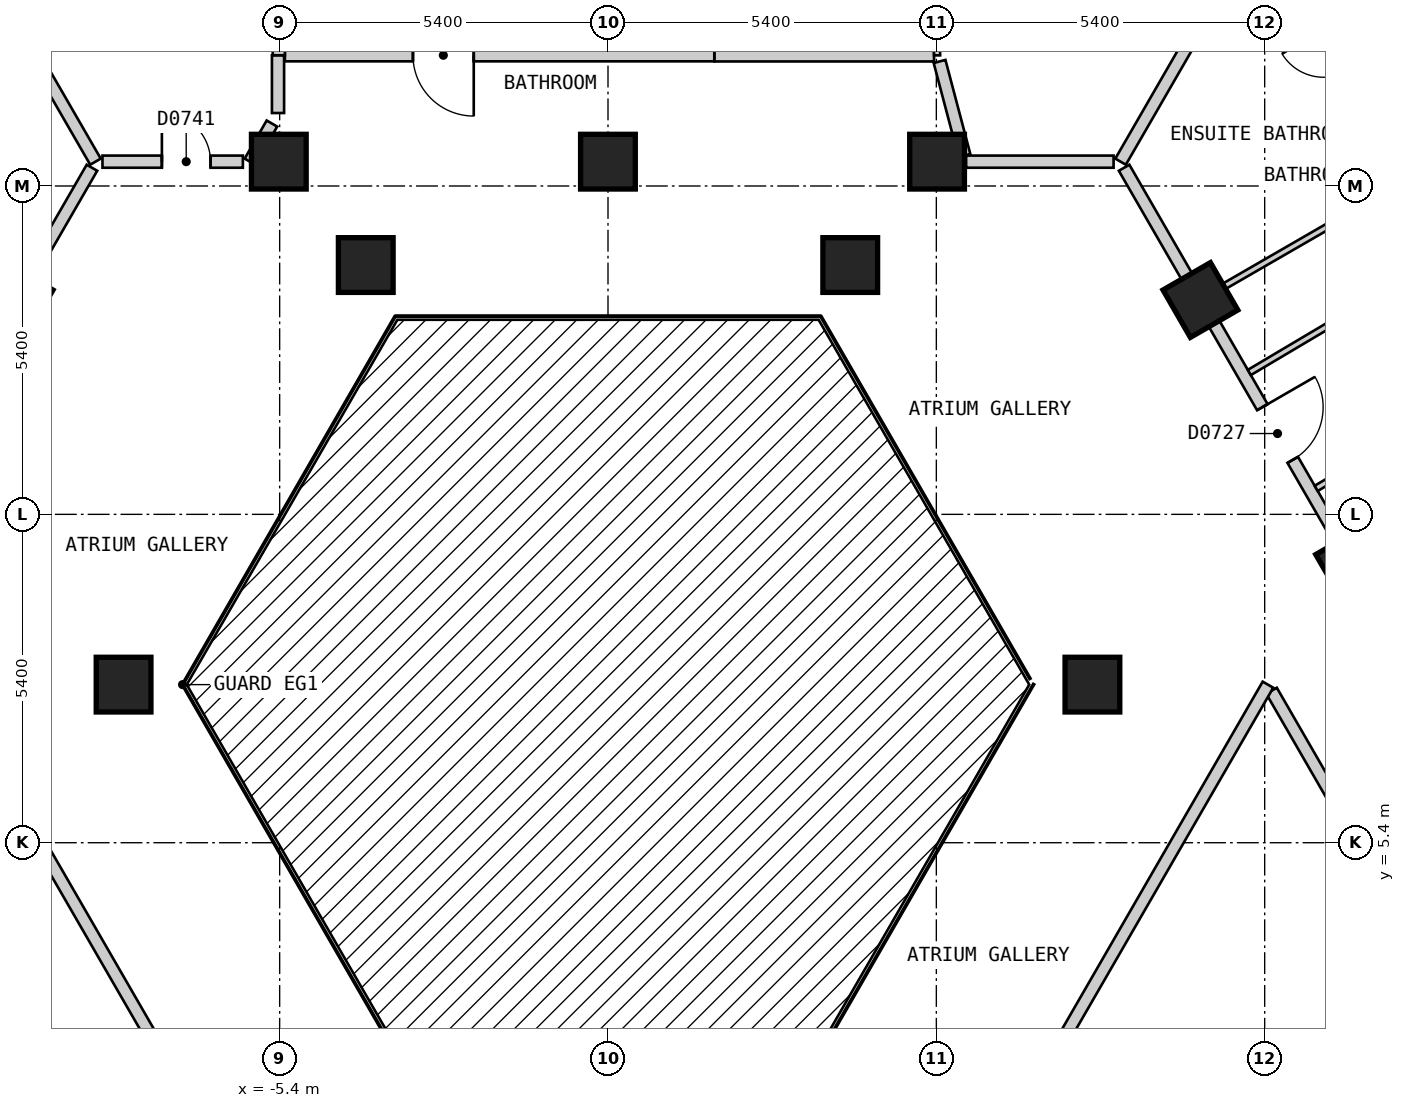
"""IFC4 building model, lengths in metres.
Left out: names, types, materials, properties, quantities, classifications, styles, units other than length and angle.
Written with IfcOpenShell. Run it as: python <this file> out.ifc"""

import sys

from ifc_helpers import new_model, si_unit, direction, frame, frame_2d, origin, origin_2d, place, context, subcontext, project, spatial, rectangle, extrude, element, fill, save


model = new_model("IFC4")
c1 = context("Model", 3, precision=1e-05, world=origin(), true_north=direction((0.0, 1.0)))
c2 = subcontext(c1, "Body", "Model", "MODEL_VIEW")
j1 = project(units=[si_unit("LENGTHUNIT", "METRE"), si_unit("PLANEANGLEUNIT", "RADIAN")], contexts=[c1])
p1 = place(None, origin())
s1 = spatial("IfcSite", under=j1, at=p1, CompositionType="ELEMENT")
p2 = place(p1, origin())
s2 = spatial("IfcBuilding", under=s1, at=p2, CompositionType="ELEMENT")
p3 = place(p2, frame((0.0, 0.0, 99.0)))
s3 = spatial("IfcBuildingStorey", under=s2, at=p3, CompositionType="ELEMENT", Elevation=99.0)
for number, where, z_axis, x_axis in (
    (1, (12.255, 9.975, 0.0), (0.0, 0.0, 1.0), (-0.5, 0.866, 0.0)),
    (2, (7.967, 8.0, 0.0), (0.0, 0.0, 1.0), (1.0, 0.0, 0.0)),
    (3, (9.743, 14.325, 0.0), (0.0, 0.0, 1.0), (-0.5, 0.866, 0.0)),
    (4, (5.412, 16.6, 0.0), (0.0, 0.0, 1.0), (-1.0, 0.0, 0.0)),
    (5, (3.984, 14.9, 0.0), (0.0, 0.0, 1.0), (1.0, 0.0, 0.0)),
    (6, (-0.001, 16.6, 0.0), (0.0, 0.0, 1.0), (-1.0, 0.0, 0.0)),
    (7, (-3.984, 14.9, 0.0), (0.0, 0.0, 1.0), (1.0, 0.0, 0.0)),
    (8, (-5.414, 16.6, 0.0), (0.0, 0.0, 1.0), (-1.0, 0.0, 0.0)),
    (9, (-9.743, 14.325, 0.0), (0.0, 0.0, 1.0), (-0.5, -0.866, 0.0)),
    (10, (-7.967, 8.0, 0.0), (0.0, 0.0, 1.0), (1.0, 0.0, 0.0)),
):
    element("IfcColumn", number, at=place(p3, frame(where, z_axis=z_axis, x_axis=x_axis)), inside=s3, PredefinedType="COLUMN", context=c2, shape_type="SweptSolid", body=[
        extrude(rectangle(XDim=0.9, YDim=0.9, at=origin_2d()), origin(), (0.0, 0.0, 1.0), 3.0),
    ])
p4 = place(p3, frame((-10.796, 7.899, 0.0), z_axis=(0.0, 0.0, 1.0), x_axis=(0.500010383074, -0.866019409031, 0.0)))
e11 = element("IfcWall", 11, at=p4, inside=s3, PredefinedType="PARTITIONING", context=c2, shape_type="SweptSolid", body=[
    extrude(rectangle(XDim=7.535, YDim=0.2, at=frame_2d((3.768, 0.0))), origin(), (0.0, 0.0, 1.0), 2.7),
])
p5 = place(p3, frame((5.453, 18.248, 0.0), z_axis=(0.0, 0.0, 1.0), x_axis=(0.255687088482, -0.9667595941, 0.0)))
e12 = element("IfcWall", 12, at=p5, inside=s3, PredefinedType="PARTITIONING", context=c2, shape_type="SweptSolid", body=[
    extrude(rectangle(XDim=1.6, YDim=0.2, at=frame_2d((0.8, 0.0))), origin(), (0.0, 0.0, 1.0), 2.7),
])
p6 = place(p3, frame((10.913, 7.899, 0.0), z_axis=(0.0, 0.0, 1.0), x_axis=(0.500028940566, -0.866008694296, 0.0)))
e13 = element("IfcWall", 13, at=p6, inside=s3, PredefinedType="PARTITIONING", context=c2, shape_type="SweptSolid", body=[
    extrude(rectangle(XDim=10.159, YDim=0.2, at=frame_2d((5.08, 0.0))), origin(), (0.0, 0.0, 1.0), 2.7),
])
p7 = place(p6, frame((4.63, 0.0, 0.0)))
e14 = element("IfcOpeningElement", 14, at=p7, cuts=e13, PredefinedType="OPENING", context=c2, shape_type="SweptSolid", body=[
    extrude(rectangle(XDim=0.9, YDim=2.1, at=frame_2d((0.45, 1.05))), frame((0.0, 0.11, 0.0), z_axis=(0.0, -1.0, 0.0), x_axis=(1.0, 0.0, 0.0)), (0.0, 0.0, 1.0), 0.22),
])
p8 = place(p3, frame((8.488, 16.5, 0.0), z_axis=(0.0, 0.0, 1.0), x_axis=(0.499986836607, -0.86603300354, 0.0)))
e15 = element("IfcWall", 15, at=p8, inside=s3, PredefinedType="PARTITIONING", context=c2, shape_type="SweptSolid", body=[
    extrude(rectangle(XDim=20.09, YDim=0.2, at=frame_2d((10.045, 0.0))), origin(), (0.0, 0.0, 1.0), 2.7),
])
p9 = place(p8, frame((14.569, 0.0, 0.0)))
e16 = element("IfcOpeningElement", 16, at=p9, cuts=e15, PredefinedType="OPENING", context=c2, shape_type="SweptSolid", body=[
    extrude(rectangle(XDim=1.0, YDim=2.1, at=frame_2d((0.5, 1.05))), frame((0.0, 0.11, 0.0), z_axis=(0.0, -1.0, 0.0), x_axis=(1.0, 0.0, 0.0)), (0.0, 0.0, 1.0), 0.22),
])
p10 = place(p8, frame((4.547, 0.0, 0.0)))
e17 = element("IfcOpeningElement", 17, at=p10, cuts=e15, PredefinedType="OPENING", context=c2, shape_type="SweptSolid", body=[
    extrude(rectangle(XDim=1.0, YDim=2.1, at=frame_2d((0.5, 1.05))), frame((0.0, 0.11, 0.0), z_axis=(0.0, -1.0, 0.0), x_axis=(1.0, 0.0, 0.0)), (0.0, 0.0, 1.0), 0.22),
])
p11 = place(p3, frame((-8.314, 16.6, 0.0), z_axis=(0.0, 0.0, 1.0), x_axis=(1.0, 0.0, 0.0)))
e18 = element("IfcWall", 18, at=p11, inside=s3, PredefinedType="PARTITIONING", context=c2, shape_type="SweptSolid", body=[
    extrude(rectangle(XDim=2.309, YDim=0.2, at=frame_2d((1.155, 0.0))), origin(), (0.0, 0.0, 1.0), 2.7),
])
p12 = place(p11, frame((0.977, 0.0, 0.0)))
e19 = element("IfcOpeningElement", 19, at=p12, cuts=e18, PredefinedType="OPENING", context=c2, shape_type="SweptSolid", body=[
    extrude(rectangle(XDim=0.8, YDim=2.1, at=frame_2d((0.4, 1.05))), frame((0.0, 0.11, 0.0), z_axis=(0.0, -1.0, 0.0), x_axis=(1.0, 0.0, 0.0)), (0.0, 0.0, 1.0), 0.22),
])
p13 = place(p3, frame((5.889, 16.6, 0.0), z_axis=(0.0, 0.0, 1.0), x_axis=(1.0, 0.0, 0.0)))
e20 = element("IfcWall", 20, at=p13, inside=s3, PredefinedType="PARTITIONING", context=c2, shape_type="SweptSolid", body=[
    extrude(rectangle(XDim=2.426, YDim=0.2, at=frame_2d((1.213, 0.0))), origin(), (0.0, 0.0, 1.0), 2.7),
])
p14 = place(p3, frame((1.75, 18.348, 0.0), z_axis=(0.0, 0.0, 1.0), x_axis=(1.0, 0.0, 0.0)))
e21 = element("IfcWall", 21, at=p14, inside=s3, PredefinedType="PARTITIONING", context=c2, shape_type="SweptSolid", body=[
    extrude(rectangle(XDim=3.612, YDim=0.2, at=frame_2d((1.806, 0.0))), origin(), (0.0, 0.0, 1.0), 2.7),
])
p15 = place(p3, frame((-5.314, 18.35, 0.0), z_axis=(0.0, 0.0, 1.0), x_axis=(1.0, 0.0, 0.0)))
e22 = element("IfcWall", 22, at=p15, inside=s3, PredefinedType="PARTITIONING", context=c2, shape_type="SweptSolid", body=[
    extrude(rectangle(XDim=7.062, YDim=0.2, at=frame_2d((3.531, 0.0))), origin(), (0.0, 0.0, 1.0), 2.7),
])
p16 = place(p15, frame((2.106, 0.0, 0.0)))
e23 = element("IfcOpeningElement", 23, at=p16, cuts=e22, PredefinedType="OPENING", context=c2, shape_type="SweptSolid", body=[
    extrude(rectangle(XDim=1.0, YDim=2.1, at=frame_2d((0.5, 1.05))), frame((0.0, 0.11, 0.0), z_axis=(0.0, -1.0, 0.0), x_axis=(1.0, 0.0, 0.0)), (0.0, 0.0, 1.0), 0.22),
])
p17 = place(p3, frame((6.928, 1.2, 0.0), z_axis=(0.0, 0.0, 1.0), x_axis=(0.500055327065, 0.865993458332, 0.0)))
e24 = element("IfcWall", 24, at=p17, inside=s3, PredefinedType="PARTITIONING", context=c2, shape_type="SweptSolid", body=[
    extrude(rectangle(XDim=7.851, YDim=0.2, at=frame_2d((3.926, 0.0))), origin(), (0.0, 0.0, 1.0), 2.7),
])
p18 = place(p3, frame((-5.889, 16.6, 0.0), z_axis=(0.0, 0.0, 1.0), x_axis=(0.499839240638, 0.866118198353, 0.0)))
e25 = element("IfcWall", 25, at=p18, inside=s3, PredefinedType="PARTITIONING", context=c2, shape_type="SweptSolid", body=[
    extrude(rectangle(XDim=0.724, YDim=0.2, at=frame_2d((0.362, 0.0))), origin(), (0.0, 0.0, 1.0), 2.7),
])
p19 = place(p3, frame((-18.533, -0.901, 0.0), z_axis=(0.0, 0.0, 1.0), x_axis=(0.499981198768, 0.866036258409, 0.0)))
e26 = element("IfcWall", 26, at=p19, inside=s3, PredefinedType="PARTITIONING", context=c2, shape_type="SweptSolid", body=[
    extrude(rectangle(XDim=20.093, YDim=0.2, at=frame_2d((10.046, 0.0))), origin(), (0.0, 0.0, 1.0), 2.7),
])
p20 = place(p19, frame((14.57, 0.0, 0.0)))
e27 = element("IfcOpeningElement", 27, at=p20, cuts=e26, PredefinedType="OPENING", context=c2, shape_type="SweptSolid", body=[
    extrude(rectangle(XDim=1.0, YDim=2.1, at=frame_2d((0.5, 1.05))), frame((0.0, 0.11, 0.0), z_axis=(0.0, -1.0, 0.0), x_axis=(1.0, 0.0, 0.0)), (0.0, 0.0, 1.0), 0.22),
])
p21 = place(p19, frame((4.523, 0.0, 0.0)))
e28 = element("IfcOpeningElement", 28, at=p21, cuts=e26, PredefinedType="OPENING", context=c2, shape_type="SweptSolid", body=[
    extrude(rectangle(XDim=1.0, YDim=2.1, at=frame_2d((0.5, 1.05))), frame((0.0, 0.11, 0.0), z_axis=(0.0, -1.0, 0.0), x_axis=(1.0, 0.0, 0.0)), (0.0, 0.0, 1.0), 0.22),
])
p22 = place(p3, frame((-5.427, 17.4, 0.0), z_axis=(0.0, 0.0, 1.0), x_axis=(0.0, 1.0, 0.0)))
e29 = element("IfcWall", 29, at=p22, inside=s3, PredefinedType="PARTITIONING", context=c2, shape_type="SweptSolid", body=[
    extrude(rectangle(XDim=0.95, YDim=0.2, at=frame_2d((0.475, 0.0))), origin(), (0.0, 0.0, 1.0), 2.7),
])
p23 = place(p3, frame((10.706, 20.543, 0.0), z_axis=(0.0, 0.0, 1.0), x_axis=(0.518240414093, -0.855234981278, 0.0)))
e30 = element("IfcWall", 30, at=p23, inside=s3, PredefinedType="PARTITIONING", context=c2, shape_type="SweptSolid", body=[
    extrude(rectangle(XDim=4.855, YDim=0.1, at=frame_2d((2.427, 0.0))), origin(), (0.0, 0.0, 1.0), 2.7),
])
p24 = place(p23, frame((2.052, 0.0, 0.0)))
e31 = element("IfcOpeningElement", 31, at=p24, cuts=e30, PredefinedType="OPENING", context=c2, shape_type="SweptSolid", body=[
    extrude(rectangle(XDim=0.8, YDim=2.1, at=frame_2d((0.4, 1.05))), frame((0.0, 0.06, 0.0), z_axis=(0.0, -1.0, 0.0), x_axis=(1.0, 0.0, 0.0)), (0.0, 0.0, 1.0), 0.12),
])
p25 = place(p3, frame((5.412, 22.005, 0.0), z_axis=(0.0, 0.0, 1.0), x_axis=(0.0, -1.0, 0.0)))
e32 = element("IfcWall", 32, at=p25, inside=s3, PredefinedType="PARTITIONING", context=c2, shape_type="SweptSolid", body=[
    extrude(rectangle(XDim=3.657, YDim=0.1, at=frame_2d((1.829, 0.0))), origin(), (0.0, 0.0, 1.0), 2.7),
])
p26 = place(p3, frame((9.83, 14.375, 0.0), z_axis=(0.0, 0.0, 1.0), x_axis=(0.866016855193, 0.500014806302, 0.0)))
e33 = element("IfcWall", 33, at=p26, inside=s3, PredefinedType="PARTITIONING", context=c2, shape_type="SweptSolid", body=[
    extrude(rectangle(XDim=10.0, YDim=0.1, at=frame_2d((5.0, 0.0))), origin(), (0.0, 0.0, 1.0), 2.7),
])
p27 = place(p26, frame((6.523, 0.0, 0.0)))
e34 = element("IfcOpeningElement", 34, at=p27, cuts=e33, PredefinedType="OPENING", context=c2, shape_type="SweptSolid", body=[
    extrude(rectangle(XDim=0.9, YDim=2.1, at=frame_2d((0.45, 1.05))), frame((0.0, 0.06, 0.0), z_axis=(0.0, -1.0, 0.0), x_axis=(1.0, 0.0, 0.0)), (0.0, 0.0, 1.0), 0.12),
])
p28 = place(p3, frame((11.647, 11.227, 0.0), z_axis=(0.0, 0.0, 1.0), x_axis=(0.859997349349, 0.510298500011, 0.0)))
e35 = element("IfcWall", 35, at=p28, inside=s3, PredefinedType="PARTITIONING", context=c2, shape_type="SweptSolid", body=[
    extrude(rectangle(XDim=3.898, YDim=0.1, at=frame_2d((1.949, 0.0))), origin(), (0.0, 0.0, 1.0), 2.7),
])
p29 = place(p28, frame((1.473, 0.0, 0.0)))
e36 = element("IfcOpeningElement", 36, at=p29, cuts=e35, PredefinedType="OPENING", context=c2, shape_type="SweptSolid", body=[
    extrude(rectangle(XDim=0.9, YDim=2.1, at=frame_2d((0.45, 1.05))), frame((0.0, 0.06, 0.0), z_axis=(0.0, -1.0, 0.0), x_axis=(1.0, 0.0, 0.0)), (0.0, 0.0, 1.0), 0.12),
])
p30 = place(p3, frame((10.547, 13.133, 0.0), z_axis=(0.0, 0.0, 1.0), x_axis=(0.860090994311, 0.510140648749, 0.0)))
e37 = element("IfcWall", 37, at=p30, inside=s3, PredefinedType="PARTITIONING", context=c2, shape_type="SweptSolid", body=[
    extrude(rectangle(XDim=3.897, YDim=0.1, at=frame_2d((1.948, 0.0))), origin(), (0.0, 0.0, 1.0), 2.7),
])
p31 = place(p30, frame((1.523, 0.0, 0.0)))
e38 = element("IfcOpeningElement", 38, at=p31, cuts=e37, PredefinedType="OPENING", context=c2, shape_type="SweptSolid", body=[
    extrude(rectangle(XDim=0.8, YDim=2.1, at=frame_2d((0.4, 1.05))), frame((0.0, 0.06, 0.0), z_axis=(0.0, -1.0, 0.0), x_axis=(1.0, 0.0, 0.0)), (0.0, 0.0, 1.0), 0.12),
])
p32 = place(p3, frame((-10.727, 20.58, 0.0), z_axis=(0.0, 0.0, 1.0), x_axis=(0.500041272028, -0.866001574057, 0.0)))
e39 = element("IfcWall", 39, at=p32, inside=s3, PredefinedType="PARTITIONING", context=c2, shape_type="SweptSolid", body=[
    extrude(rectangle(XDim=4.596, YDim=0.2, at=frame_2d((2.298, 0.0))), origin(), (0.0, 0.0, 1.0), 2.7),
])
p33 = place(p3, frame((-5.414, 26.7, 0.0), z_axis=(0.0, 0.0, 1.0), x_axis=(0.0, -1.0, 0.0)))
e40 = element("IfcWall", 40, at=p33, inside=s3, PredefinedType="PARTITIONING", context=c2, shape_type="SweptSolid", body=[
    extrude(rectangle(XDim=8.35, YDim=0.2, at=frame_2d((4.175, 0.0))), origin(), (0.0, 0.0, 1.0), 2.7),
])
p34 = place(p3, frame((8.43, 16.6, 0.0), z_axis=(0.0, 0.0, 1.0), x_axis=(0.500072613115, 0.865983476524, 0.0)))
e41 = element("IfcWall", 41, at=p34, inside=s3, PredefinedType="PARTITIONING", context=c2, shape_type="SweptSolid", body=[
    extrude(rectangle(XDim=4.385, YDim=0.2, at=frame_2d((2.193, 0.0))), origin(), (0.0, 0.0, 1.0), 2.7),
])
p35 = place(p10, origin())
e42 = element("IfcDoor", 42, at=p35, inside=s3, OperationType="SINGLE_SWING_LEFT", PredefinedType="DOOR", context=c2, shape_type="SweptSolid", body=[
    extrude(rectangle(XDim=1.0, YDim=2.1, at=frame_2d((0.5, 1.05))), frame((0.0, 0.025, 0.0), z_axis=(0.0, -1.0, 0.0), x_axis=(1.0, 0.0, 0.0)), (0.0, 0.0, 1.0), 0.05),
])
fill(e17, e42)
p36 = place(p24, origin())
e43 = element("IfcDoor", 43, at=p36, inside=s3, OperationType="SINGLE_SWING_LEFT", PredefinedType="DOOR", context=c2, shape_type="SweptSolid", body=[
    extrude(rectangle(XDim=0.8, YDim=2.1, at=frame_2d((0.4, 1.05))), frame((0.0, 0.025, 0.0), z_axis=(0.0, -1.0, 0.0), x_axis=(1.0, 0.0, 0.0)), (0.0, 0.0, 1.0), 0.05),
])
fill(e31, e43)
p37 = place(p16, origin())
e44 = element("IfcDoor", 44, at=p37, inside=s3, OperationType="SINGLE_SWING_RIGHT", PredefinedType="DOOR", context=c2, shape_type="SweptSolid", body=[
    extrude(rectangle(XDim=1.0, YDim=2.1, at=frame_2d((0.5, 1.05))), frame((0.0, 0.025, 0.0), z_axis=(0.0, -1.0, 0.0), x_axis=(1.0, 0.0, 0.0)), (0.0, 0.0, 1.0), 0.05),
])
fill(e23, e44)
p38 = place(p12, origin())
e45 = element("IfcDoor", 45, at=p38, inside=s3, OperationType="SINGLE_SWING_LEFT", PredefinedType="DOOR", context=c2, shape_type="SweptSolid", body=[
    extrude(rectangle(XDim=0.8, YDim=2.1, at=frame_2d((0.4, 1.05))), frame((0.0, 0.025, 0.0), z_axis=(0.0, -1.0, 0.0), x_axis=(1.0, 0.0, 0.0)), (0.0, 0.0, 1.0), 0.05),
])
fill(e19, e45)
save(model, sys.argv[1])
